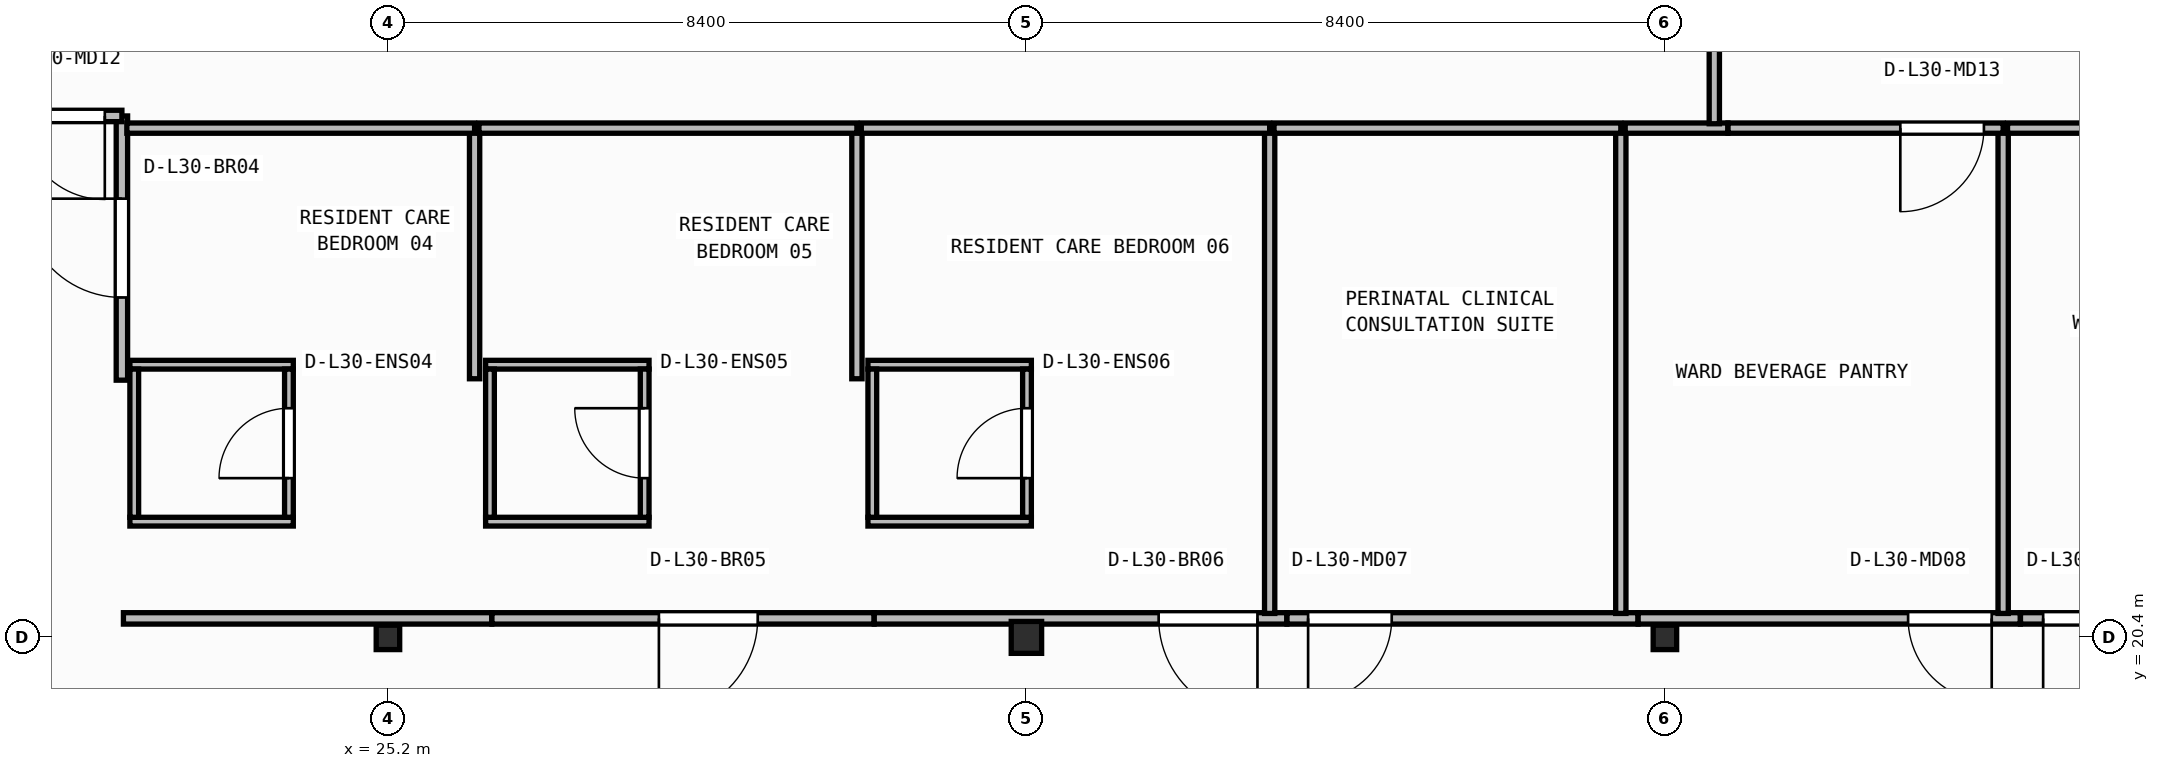
"""IFC4 building model, lengths in metres.
Left out: names, types, materials, properties, quantities, classifications, styles, units other than length and angle.
Written with IfcOpenShell. Run it as: python <this file> out.ifc"""

import sys

from ifc_helpers import new_model, si_unit, direction, frame, frame_2d, origin, origin_2d, place, context, subcontext, project, spatial, rectangle, i_section, extrude, element, fill, save


model = new_model("IFC4")
c1 = context("Model", 3, precision=1e-05, world=origin(), true_north=direction((0.0, 1.0)))
c2 = subcontext(c1, "Body", "Model", "MODEL_VIEW")
j1 = project(units=[si_unit("LENGTHUNIT", "METRE"), si_unit("PLANEANGLEUNIT", "RADIAN")], contexts=[c1])
p1 = place(None, origin())
s1 = spatial("IfcSite", under=j1, at=p1, CompositionType="ELEMENT")
p2 = place(p1, origin())
s2 = spatial("IfcBuilding", under=s1, at=p2, CompositionType="ELEMENT")
p3 = place(p2, frame((0.0, 0.0, 123.1)))
s3 = spatial("IfcBuildingStorey", under=s2, at=p3, CompositionType="ELEMENT", Elevation=123.1)
p4 = place(p3, frame((25.2, 20.4, 0.0), z_axis=(0.0, 0.0, 1.0), x_axis=(1.0, 0.0, 0.0)))
e1 = element("IfcColumn", 1, at=p4, inside=s3, PredefinedType="COLUMN", context=c2, shape_type="SweptSolid", body=[
    extrude(i_section(OverallWidth=0.309, OverallDepth=0.321, WebThickness=0.014, FlangeThickness=0.022, FilletRadius=0.017, at=origin_2d()), origin(), (0.0, 0.0, 1.0), 3.95),
])
p5 = place(p3, frame((33.6, 20.4, 0.0), z_axis=(0.0, 0.0, 1.0), x_axis=(1.0, 0.0, 0.0)))
e2 = element("IfcColumn", 2, at=p5, inside=s3, PredefinedType="COLUMN", context=c2, shape_type="SweptSolid", body=[
    extrude(i_section(OverallWidth=0.4, OverallDepth=0.42, WebThickness=0.025, FlangeThickness=0.04, at=origin_2d()), origin(), (0.0, 0.0, 1.0), 3.95),
])
p6 = place(p3, frame((42.0, 20.4, 0.0), z_axis=(0.0, 0.0, 1.0), x_axis=(1.0, 0.0, 0.0)))
e3 = element("IfcColumn", 3, at=p6, inside=s3, PredefinedType="COLUMN", context=c2, shape_type="SweptSolid", body=[
    extrude(i_section(OverallWidth=0.309, OverallDepth=0.321, WebThickness=0.014, FlangeThickness=0.022, FilletRadius=0.017, at=origin_2d()), origin(), (0.0, 0.0, 1.0), 3.95),
])
for number, where, z_axis, x_axis in (
    (4, (21.805, 21.923, 0.0), (0.0, 0.0, 1.0), (1.0, 0.0, 0.0)),
    (5, (21.805, 23.988, 0.0), (0.0, 0.0, 1.0), (1.0, 0.0, 0.0)),
):
    element("IfcWall", number, at=place(p3, frame(where, z_axis=z_axis, x_axis=x_axis)), inside=s3, PredefinedType="PARTITIONING", context=c2, shape_type="SweptSolid", body=[
        extrude(rectangle(XDim=2.15, YDim=0.115, at=frame_2d((1.075, 0.0))), origin(), (0.0, 0.0, 1.0), 3.71),
    ])
p7 = place(p3, frame((21.863, 21.98, 0.0), z_axis=(0.0, 0.0, 1.0), x_axis=(0.0, 1.0, 0.0)))
e6 = element("IfcWall", 6, at=p7, inside=s3, PredefinedType="PARTITIONING", context=c2, shape_type="SweptSolid", body=[
    extrude(rectangle(XDim=1.95, YDim=0.115, at=frame_2d((0.975, 0.0))), origin(), (0.0, 0.0, 1.0), 3.71),
])
p8 = place(p3, frame((23.897, 21.98, 0.0), z_axis=(0.0, 0.0, 1.0), x_axis=(0.0, 1.0, 0.0)))
e7 = element("IfcWall", 7, at=p8, inside=s3, PredefinedType="PARTITIONING", context=c2, shape_type="SweptSolid", body=[
    extrude(rectangle(XDim=1.95, YDim=0.115, at=frame_2d((0.975, 0.0))), origin(), (0.0, 0.0, 1.0), 3.71),
])
p9 = place(p8, frame((0.515, 0.0, 0.0)))
e8 = element("IfcOpeningElement", 8, at=p9, cuts=e7, PredefinedType="OPENING", context=c2, shape_type="SweptSolid", body=[
    extrude(rectangle(XDim=0.92, YDim=2.1, at=frame_2d((0.46, 1.05))), frame((0.0, 0.067, 0.0), z_axis=(0.0, -1.0, 0.0), x_axis=(1.0, 0.0, 0.0)), (0.0, 0.0, 1.0), 0.135),
])
for number, where, z_axis, x_axis in (
    (9, (26.485, 21.923, 0.0), (0.0, 0.0, 1.0), (1.0, 0.0, 0.0)),
    (10, (26.485, 23.988, 0.0), (0.0, 0.0, 1.0), (1.0, 0.0, 0.0)),
):
    element("IfcWall", number, at=place(p3, frame(where, z_axis=z_axis, x_axis=x_axis)), inside=s3, PredefinedType="PARTITIONING", context=c2, shape_type="SweptSolid", body=[
        extrude(rectangle(XDim=2.15, YDim=0.115, at=frame_2d((1.075, 0.0))), origin(), (0.0, 0.0, 1.0), 3.71),
    ])
p10 = place(p3, frame((26.542, 21.98, 0.0), z_axis=(0.0, 0.0, 1.0), x_axis=(0.0, 1.0, 0.0)))
e11 = element("IfcWall", 11, at=p10, inside=s3, PredefinedType="PARTITIONING", context=c2, shape_type="SweptSolid", body=[
    extrude(rectangle(XDim=1.95, YDim=0.115, at=frame_2d((0.975, 0.0))), origin(), (0.0, 0.0, 1.0), 3.71),
])
p11 = place(p3, frame((28.577, 21.98, 0.0), z_axis=(0.0, 0.0, 1.0), x_axis=(0.0, 1.0, 0.0)))
e12 = element("IfcWall", 12, at=p11, inside=s3, PredefinedType="PARTITIONING", context=c2, shape_type="SweptSolid", body=[
    extrude(rectangle(XDim=1.95, YDim=0.115, at=frame_2d((0.975, 0.0))), origin(), (0.0, 0.0, 1.0), 3.71),
])
p12 = place(p11, frame((0.515, 0.0, 0.0)))
e13 = element("IfcOpeningElement", 13, at=p12, cuts=e12, PredefinedType="OPENING", context=c2, shape_type="SweptSolid", body=[
    extrude(rectangle(XDim=0.92, YDim=2.1, at=frame_2d((0.46, 1.05))), frame((0.0, 0.067, 0.0), z_axis=(0.0, -1.0, 0.0), x_axis=(1.0, 0.0, 0.0)), (0.0, 0.0, 1.0), 0.135),
])
for number, where, z_axis, x_axis in (
    (14, (31.515, 21.923, 0.0), (0.0, 0.0, 1.0), (1.0, 0.0, 0.0)),
    (15, (31.515, 23.988, 0.0), (0.0, 0.0, 1.0), (1.0, 0.0, 0.0)),
):
    element("IfcWall", number, at=place(p3, frame(where, z_axis=z_axis, x_axis=x_axis)), inside=s3, PredefinedType="PARTITIONING", context=c2, shape_type="SweptSolid", body=[
        extrude(rectangle(XDim=2.15, YDim=0.115, at=frame_2d((1.075, 0.0))), origin(), (0.0, 0.0, 1.0), 3.71),
    ])
p13 = place(p3, frame((31.573, 21.98, 0.0), z_axis=(0.0, 0.0, 1.0), x_axis=(0.0, 1.0, 0.0)))
e16 = element("IfcWall", 16, at=p13, inside=s3, PredefinedType="PARTITIONING", context=c2, shape_type="SweptSolid", body=[
    extrude(rectangle(XDim=1.95, YDim=0.115, at=frame_2d((0.975, 0.0))), origin(), (0.0, 0.0, 1.0), 3.71),
])
p14 = place(p3, frame((33.607, 21.98, 0.0), z_axis=(0.0, 0.0, 1.0), x_axis=(0.0, 1.0, 0.0)))
e17 = element("IfcWall", 17, at=p14, inside=s3, PredefinedType="PARTITIONING", context=c2, shape_type="SweptSolid", body=[
    extrude(rectangle(XDim=1.95, YDim=0.115, at=frame_2d((0.975, 0.0))), origin(), (0.0, 0.0, 1.0), 3.152),
])
p15 = place(p14, frame((0.515, 0.0, 0.0)))
e18 = element("IfcOpeningElement", 18, at=p15, cuts=e17, PredefinedType="OPENING", context=c2, shape_type="SweptSolid", body=[
    extrude(rectangle(XDim=0.92, YDim=2.1, at=frame_2d((0.46, 1.05))), frame((0.0, 0.067, 0.0), z_axis=(0.0, -1.0, 0.0), x_axis=(1.0, 0.0, 0.0)), (0.0, 0.0, 1.0), 0.135),
])
p16 = place(p3, frame((21.7, 23.784, 0.0), z_axis=(0.0, 0.0, 1.0), x_axis=(0.0, 1.0, 0.0)))
e19 = element("IfcWall", 19, at=p16, inside=s3, PredefinedType="PARTITIONING", context=c2, shape_type="SweptSolid", body=[
    extrude(rectangle(XDim=3.476, YDim=0.15, at=frame_2d((1.738, 0.0))), origin(), (0.0, 0.0, 1.0), 3.71),
])
p17 = place(p16, frame((1.088, 0.0, 0.0)))
e20 = element("IfcOpeningElement", 20, at=p17, cuts=e19, PredefinedType="OPENING", context=c2, shape_type="SweptSolid", body=[
    extrude(rectangle(XDim=1.3, YDim=2.15, at=frame_2d((0.65, 1.075))), frame((0.0, 0.085, 0.0), z_axis=(0.0, -1.0, 0.0), x_axis=(1.0, 0.0, 0.0)), (0.0, 0.0, 1.0), 0.17),
])
p18 = place(p3, frame((21.7, 27.26, 0.0), z_axis=(0.0, 0.0, 1.0), x_axis=(-1.0, 0.0, 0.0)))
e21 = element("IfcWall", 21, at=p18, inside=s3, PredefinedType="PARTITIONING", context=c2, shape_type="SweptSolid", body=[
    extrude(rectangle(XDim=2.5, YDim=0.15, at=frame_2d((1.25, 0.0))), origin(), (0.0, 0.0, 1.0), 3.71),
])
p19 = place(p18, frame((0.225, 0.0, 0.0)))
e22 = element("IfcOpeningElement", 22, at=p19, cuts=e21, PredefinedType="OPENING", context=c2, shape_type="SweptSolid", body=[
    extrude(rectangle(XDim=1.1, YDim=2.1, at=frame_2d((0.55, 1.05))), frame((0.0, 0.085, 0.0), z_axis=(0.0, -1.0, 0.0), x_axis=(1.0, 0.0, 0.0)), (0.0, 0.0, 1.0), 0.17),
])
p20 = place(p3, frame((26.566, 20.65, 0.0), z_axis=(0.0, 0.0, 1.0), x_axis=(-1.0, 0.0, 0.0)))
e23 = element("IfcWall", 23, at=p20, inside=s3, PredefinedType="PARTITIONING", context=c2, shape_type="SweptSolid", body=[
    extrude(rectangle(XDim=4.846, YDim=0.15, at=frame_2d((2.423, 0.0))), origin(), (0.0, 0.0, 1.0), 3.083),
])
p21 = place(p3, frame((31.596, 20.65, 0.0), z_axis=(0.0, 0.0, 1.0), x_axis=(-1.0, 0.0, 0.0)))
e24 = element("IfcWall", 24, at=p21, inside=s3, PredefinedType="PARTITIONING", context=c2, shape_type="SweptSolid", body=[
    extrude(rectangle(XDim=5.028, YDim=0.15, at=frame_2d((2.514, 0.0))), origin(), (0.0, 0.0, 1.0), 3.083),
])
p22 = place(p21, frame((1.531, 0.0, 0.0)))
e25 = element("IfcOpeningElement", 25, at=p22, cuts=e24, PredefinedType="OPENING", context=c2, shape_type="SweptSolid", body=[
    extrude(rectangle(XDim=1.3, YDim=2.15, at=frame_2d((0.65, 1.075))), frame((0.0, 0.085, 0.0), z_axis=(0.0, -1.0, 0.0), x_axis=(1.0, 0.0, 0.0)), (0.0, 0.0, 1.0), 0.17),
])
p23 = place(p3, frame((37.026, 20.65, 0.0), z_axis=(0.0, 0.0, 1.0), x_axis=(-1.0, 0.0, 0.0)))
e26 = element("IfcWall", 26, at=p23, inside=s3, PredefinedType="PARTITIONING", context=c2, shape_type="SweptSolid", body=[
    extrude(rectangle(XDim=5.428, YDim=0.15, at=frame_2d((2.714, 0.0))), origin(), (0.0, 0.0, 1.0), 3.083),
])
p24 = place(p23, frame((0.386, 0.0, 0.0)))
e27 = element("IfcOpeningElement", 27, at=p24, cuts=e26, PredefinedType="OPENING", context=c2, shape_type="SweptSolid", body=[
    extrude(rectangle(XDim=1.3, YDim=2.15, at=frame_2d((0.65, 1.075))), frame((0.0, 0.085, 0.0), z_axis=(0.0, -1.0, 0.0), x_axis=(1.0, 0.0, 0.0)), (0.0, 0.0, 1.0), 0.17),
])
p25 = place(p3, frame((41.646, 20.65, 0.0), z_axis=(0.0, 0.0, 1.0), x_axis=(-1.0, 0.0, 0.0)))
e28 = element("IfcWall", 28, at=p25, inside=s3, PredefinedType="PARTITIONING", context=c2, shape_type="SweptSolid", body=[
    extrude(rectangle(XDim=4.618, YDim=0.15, at=frame_2d((2.309, 0.0))), origin(), (0.0, 0.0, 1.0), 3.083),
])
p26 = place(p25, frame((3.24, 0.0, 0.0)))
e29 = element("IfcOpeningElement", 29, at=p26, cuts=e28, PredefinedType="OPENING", context=c2, shape_type="SweptSolid", body=[
    extrude(rectangle(XDim=1.1, YDim=2.1, at=frame_2d((0.55, 1.05))), frame((0.0, 0.085, 0.0), z_axis=(0.0, -1.0, 0.0), x_axis=(1.0, 0.0, 0.0)), (0.0, 0.0, 1.0), 0.17),
])
p27 = place(p3, frame((46.676, 20.65, 0.0), z_axis=(0.0, 0.0, 1.0), x_axis=(-1.0, 0.0, 0.0)))
e30 = element("IfcWall", 30, at=p27, inside=s3, PredefinedType="PARTITIONING", context=c2, shape_type="SweptSolid", body=[
    extrude(rectangle(XDim=5.028, YDim=0.15, at=frame_2d((2.514, 0.0))), origin(), (0.0, 0.0, 1.0), 3.083),
])
p28 = place(p27, frame((0.376, 0.0, 0.0)))
e31 = element("IfcOpeningElement", 31, at=p28, cuts=e30, PredefinedType="OPENING", context=c2, shape_type="SweptSolid", body=[
    extrude(rectangle(XDim=1.1, YDim=2.1, at=frame_2d((0.55, 1.05))), frame((0.0, 0.085, 0.0), z_axis=(0.0, -1.0, 0.0), x_axis=(1.0, 0.0, 0.0)), (0.0, 0.0, 1.0), 0.17),
])
p29 = place(p3, frame((52.106, 20.65, 0.0), z_axis=(0.0, 0.0, 1.0), x_axis=(-1.0, 0.0, 0.0)))
e32 = element("IfcWall", 32, at=p29, inside=s3, PredefinedType="PARTITIONING", context=c2, shape_type="SweptSolid", body=[
    extrude(rectangle(XDim=5.428, YDim=0.15, at=frame_2d((2.714, 0.0))), origin(), (0.0, 0.0, 1.0), 3.083),
])
p30 = place(p29, frame((4.03, 0.0, 0.0)))
e33 = element("IfcOpeningElement", 33, at=p30, cuts=e32, PredefinedType="OPENING", context=c2, shape_type="SweptSolid", body=[
    extrude(rectangle(XDim=1.1, YDim=2.1, at=frame_2d((0.55, 1.05))), frame((0.0, 0.085, 0.0), z_axis=(0.0, -1.0, 0.0), x_axis=(1.0, 0.0, 0.0)), (0.0, 0.0, 1.0), 0.17),
])
p31 = place(p3, frame((26.34, 23.802, 0.0), z_axis=(0.0, 0.0, 1.0), x_axis=(0.0, 1.0, 0.0)))
e34 = element("IfcWall", 34, at=p31, inside=s3, PredefinedType="PARTITIONING", context=c2, shape_type="SweptSolid", body=[
    extrude(rectangle(XDim=3.298, YDim=0.135, at=frame_2d((1.649, 0.0))), origin(), (0.0, 0.0, 1.0), 3.71),
])
p32 = place(p3, frame((26.34, 27.1, 0.0), z_axis=(0.0, 0.0, 1.0), x_axis=(-1.0, 0.0, 0.0)))
e35 = element("IfcWall", 35, at=p32, inside=s3, PredefinedType="PARTITIONING", context=c2, shape_type="SweptSolid", body=[
    extrude(rectangle(XDim=4.575, YDim=0.135, at=frame_2d((2.288, 0.0))), origin(), (0.0, 0.0, 1.0), 3.71),
])
p33 = place(p3, frame((31.37, 23.802, 0.0), z_axis=(0.0, 0.0, 1.0), x_axis=(0.0, 1.0, 0.0)))
e36 = element("IfcWall", 36, at=p33, inside=s3, PredefinedType="PARTITIONING", context=c2, shape_type="SweptSolid", body=[
    extrude(rectangle(XDim=3.298, YDim=0.135, at=frame_2d((1.649, 0.0))), origin(), (0.0, 0.0, 1.0), 3.71),
])
p34 = place(p3, frame((31.37, 27.1, 0.0), z_axis=(0.0, 0.0, 1.0), x_axis=(-1.0, 0.0, 0.0)))
e37 = element("IfcWall", 37, at=p34, inside=s3, PredefinedType="PARTITIONING", context=c2, shape_type="SweptSolid", body=[
    extrude(rectangle(XDim=4.973, YDim=0.135, at=frame_2d((2.486, 0.0))), origin(), (0.0, 0.0, 1.0), 3.71),
])
p35 = place(p3, frame((36.8, 20.715, 0.0), z_axis=(0.0, 0.0, 1.0), x_axis=(0.0, 1.0, 0.0)))
e38 = element("IfcWall", 38, at=p35, inside=s3, PredefinedType="PARTITIONING", context=c2, shape_type="SweptSolid", body=[
    extrude(rectangle(XDim=6.385, YDim=0.135, at=frame_2d((3.192, 0.0))), origin(), (0.0, 0.0, 1.0), 3.71),
])
p36 = place(p3, frame((36.8, 27.1, 0.0), z_axis=(0.0, 0.0, 1.0), x_axis=(-1.0, 0.0, 0.0)))
e39 = element("IfcWall", 39, at=p36, inside=s3, PredefinedType="PARTITIONING", context=c2, shape_type="SweptSolid", body=[
    extrude(rectangle(XDim=5.373, YDim=0.135, at=frame_2d((2.686, 0.0))), origin(), (0.0, 0.0, 1.0), 3.71),
])
p37 = place(p3, frame((41.42, 20.715, 0.0), z_axis=(0.0, 0.0, 1.0), x_axis=(0.0, 1.0, 0.0)))
e40 = element("IfcWall", 40, at=p37, inside=s3, PredefinedType="PARTITIONING", context=c2, shape_type="SweptSolid", body=[
    extrude(rectangle(XDim=6.385, YDim=0.135, at=frame_2d((3.192, 0.0))), origin(), (0.0, 0.0, 1.0), 3.71),
])
p38 = place(p3, frame((41.42, 27.1, 0.0), z_axis=(0.0, 0.0, 1.0), x_axis=(-1.0, 0.0, 0.0)))
e41 = element("IfcWall", 41, at=p38, inside=s3, PredefinedType="PARTITIONING", context=c2, shape_type="SweptSolid", body=[
    extrude(rectangle(XDim=4.562, YDim=0.135, at=frame_2d((2.281, 0.0))), origin(), (0.0, 0.0, 1.0), 3.71),
])
p39 = place(p3, frame((46.45, 20.715, 0.0), z_axis=(0.0, 0.0, 1.0), x_axis=(0.0, 1.0, 0.0)))
e42 = element("IfcWall", 42, at=p39, inside=s3, PredefinedType="PARTITIONING", context=c2, shape_type="SweptSolid", body=[
    extrude(rectangle(XDim=6.385, YDim=0.135, at=frame_2d((3.192, 0.0))), origin(), (0.0, 0.0, 1.0), 3.71),
])
p40 = place(p3, frame((42.829, 27.1, 0.0), z_axis=(0.0, 0.0, 1.0), x_axis=(-1.0, 0.0, 0.0)))
e43 = element("IfcWall", 43, at=p40, inside=s3, PredefinedType="PARTITIONING", context=c2, shape_type="SweptSolid", body=[
    extrude(rectangle(XDim=1.351, YDim=0.135, at=frame_2d((0.676, 0.0))), origin(), (0.0, 0.0, 1.0), 3.71),
])
p41 = place(p3, frame((46.45, 27.1, 0.0), z_axis=(0.0, 0.0, 1.0), x_axis=(-1.0, 0.0, 0.0)))
e44 = element("IfcWall", 44, at=p41, inside=s3, PredefinedType="PARTITIONING", context=c2, shape_type="SweptSolid", body=[
    extrude(rectangle(XDim=3.619, YDim=0.135, at=frame_2d((1.81, 0.0))), origin(), (0.0, 0.0, 1.0), 3.71),
])
p42 = place(p41, frame((0.253, 0.0, 0.0)))
e45 = element("IfcOpeningElement", 45, at=p42, cuts=e44, PredefinedType="OPENING", context=c2, shape_type="SweptSolid", body=[
    extrude(rectangle(XDim=1.1, YDim=2.1, at=frame_2d((0.55, 1.05))), frame((0.0, 0.077, 0.0), z_axis=(0.0, -1.0, 0.0), x_axis=(1.0, 0.0, 0.0)), (0.0, 0.0, 1.0), 0.155),
])
p43 = place(p3, frame((51.88, 27.1, 0.0), z_axis=(0.0, 0.0, 1.0), x_axis=(-1.0, 0.0, 0.0)))
e46 = element("IfcWall", 46, at=p43, inside=s3, PredefinedType="PARTITIONING", context=c2, shape_type="SweptSolid", body=[
    extrude(rectangle(XDim=5.372, YDim=0.135, at=frame_2d((2.686, 0.0))), origin(), (0.0, 0.0, 1.0), 3.71),
])
p44 = place(p3, frame((42.65, 27.157, 0.0), z_axis=(0.0, 0.0, 1.0), x_axis=(0.0, 1.0, 0.0)))
e47 = element("IfcWall", 47, at=p44, inside=s3, PredefinedType="PARTITIONING", context=c2, shape_type="SweptSolid", body=[
    extrude(rectangle(XDim=4.381, YDim=0.135, at=frame_2d((2.191, 0.0))), origin(), (0.0, 0.0, 1.0), 3.71),
])
p45 = place(p9, origin())
e48 = element("IfcDoor", 48, at=p45, inside=s3, OperationType="SINGLE_SWING_LEFT", PredefinedType="DOOR", context=c2, shape_type="SweptSolid", body=[
    extrude(rectangle(XDim=0.92, YDim=2.1, at=frame_2d((0.46, 1.05))), frame((0.0, 0.025, 0.0), z_axis=(0.0, -1.0, 0.0), x_axis=(1.0, 0.0, 0.0)), (0.0, 0.0, 1.0), 0.05),
])
fill(e8, e48)
p46 = place(p12, origin())
e49 = element("IfcDoor", 49, at=p46, inside=s3, OperationType="SINGLE_SWING_RIGHT", PredefinedType="DOOR", context=c2, shape_type="SweptSolid", body=[
    extrude(rectangle(XDim=0.92, YDim=2.1, at=frame_2d((0.46, 1.05))), frame((0.0, 0.025, 0.0), z_axis=(0.0, -1.0, 0.0), x_axis=(1.0, 0.0, 0.0)), (0.0, 0.0, 1.0), 0.05),
])
fill(e13, e49)
p47 = place(p15, origin())
e50 = element("IfcDoor", 50, at=p47, inside=s3, OperationType="SINGLE_SWING_LEFT", PredefinedType="DOOR", context=c2, shape_type="SweptSolid", body=[
    extrude(rectangle(XDim=0.92, YDim=2.1, at=frame_2d((0.46, 1.05))), frame((0.0, 0.025, 0.0), z_axis=(0.0, -1.0, 0.0), x_axis=(1.0, 0.0, 0.0)), (0.0, 0.0, 1.0), 0.05),
])
fill(e18, e50)
p48 = place(p17, origin())
e51 = element("IfcDoor", 51, at=p48, inside=s3, OperationType="SINGLE_SWING_RIGHT", PredefinedType="DOOR", context=c2, shape_type="SweptSolid", body=[
    extrude(rectangle(XDim=1.3, YDim=2.15, at=frame_2d((0.65, 1.075))), frame((0.0, 0.025, 0.0), z_axis=(0.0, -1.0, 0.0), x_axis=(1.0, 0.0, 0.0)), (0.0, 0.0, 1.0), 0.05),
])
fill(e20, e51)
p49 = place(p19, origin())
e52 = element("IfcDoor", 52, at=p49, inside=s3, OperationType="SINGLE_SWING_LEFT", PredefinedType="DOOR", context=c2, shape_type="SweptSolid", body=[
    extrude(rectangle(XDim=1.1, YDim=2.1, at=frame_2d((0.55, 1.05))), frame((0.0, 0.025, 0.0), z_axis=(0.0, -1.0, 0.0), x_axis=(1.0, 0.0, 0.0)), (0.0, 0.0, 1.0), 0.05),
])
fill(e22, e52)
p50 = place(p22, origin())
e53 = element("IfcDoor", 53, at=p50, inside=s3, OperationType="SINGLE_SWING_RIGHT", PredefinedType="DOOR", context=c2, shape_type="SweptSolid", body=[
    extrude(rectangle(XDim=1.3, YDim=2.15, at=frame_2d((0.65, 1.075))), frame((0.0, 0.025, 0.0), z_axis=(0.0, -1.0, 0.0), x_axis=(1.0, 0.0, 0.0)), (0.0, 0.0, 1.0), 0.05),
])
fill(e25, e53)
p51 = place(p24, origin())
e54 = element("IfcDoor", 54, at=p51, inside=s3, OperationType="SINGLE_SWING_LEFT", PredefinedType="DOOR", context=c2, shape_type="SweptSolid", body=[
    extrude(rectangle(XDim=1.3, YDim=2.15, at=frame_2d((0.65, 1.075))), frame((0.0, 0.025, 0.0), z_axis=(0.0, -1.0, 0.0), x_axis=(1.0, 0.0, 0.0)), (0.0, 0.0, 1.0), 0.05),
])
fill(e27, e54)
p52 = place(p26, origin())
e55 = element("IfcDoor", 55, at=p52, inside=s3, OperationType="SINGLE_SWING_RIGHT", PredefinedType="DOOR", context=c2, shape_type="SweptSolid", body=[
    extrude(rectangle(XDim=1.1, YDim=2.1, at=frame_2d((0.55, 1.05))), frame((0.0, 0.025, 0.0), z_axis=(0.0, -1.0, 0.0), x_axis=(1.0, 0.0, 0.0)), (0.0, 0.0, 1.0), 0.05),
])
fill(e29, e55)
p53 = place(p28, origin())
e56 = element("IfcDoor", 56, at=p53, inside=s3, OperationType="SINGLE_SWING_LEFT", PredefinedType="DOOR", context=c2, shape_type="SweptSolid", body=[
    extrude(rectangle(XDim=1.1, YDim=2.1, at=frame_2d((0.55, 1.05))), frame((0.0, 0.025, 0.0), z_axis=(0.0, -1.0, 0.0), x_axis=(1.0, 0.0, 0.0)), (0.0, 0.0, 1.0), 0.05),
])
fill(e31, e56)
p54 = place(p30, origin())
e57 = element("IfcDoor", 57, at=p54, inside=s3, OperationType="SINGLE_SWING_RIGHT", PredefinedType="DOOR", context=c2, shape_type="SweptSolid", body=[
    extrude(rectangle(XDim=1.1, YDim=2.1, at=frame_2d((0.55, 1.05))), frame((0.0, 0.025, 0.0), z_axis=(0.0, -1.0, 0.0), x_axis=(1.0, 0.0, 0.0)), (0.0, 0.0, 1.0), 0.05),
])
fill(e33, e57)
p55 = place(p42, origin())
e58 = element("IfcDoor", 58, at=p55, inside=s3, OperationType="SINGLE_SWING_RIGHT", PredefinedType="DOOR", context=c2, shape_type="SweptSolid", body=[
    extrude(rectangle(XDim=1.1, YDim=2.1, at=frame_2d((0.55, 1.05))), frame((0.0, 0.025, 0.0), z_axis=(0.0, -1.0, 0.0), x_axis=(1.0, 0.0, 0.0)), (0.0, 0.0, 1.0), 0.05),
])
fill(e45, e58)
save(model, sys.argv[1])
